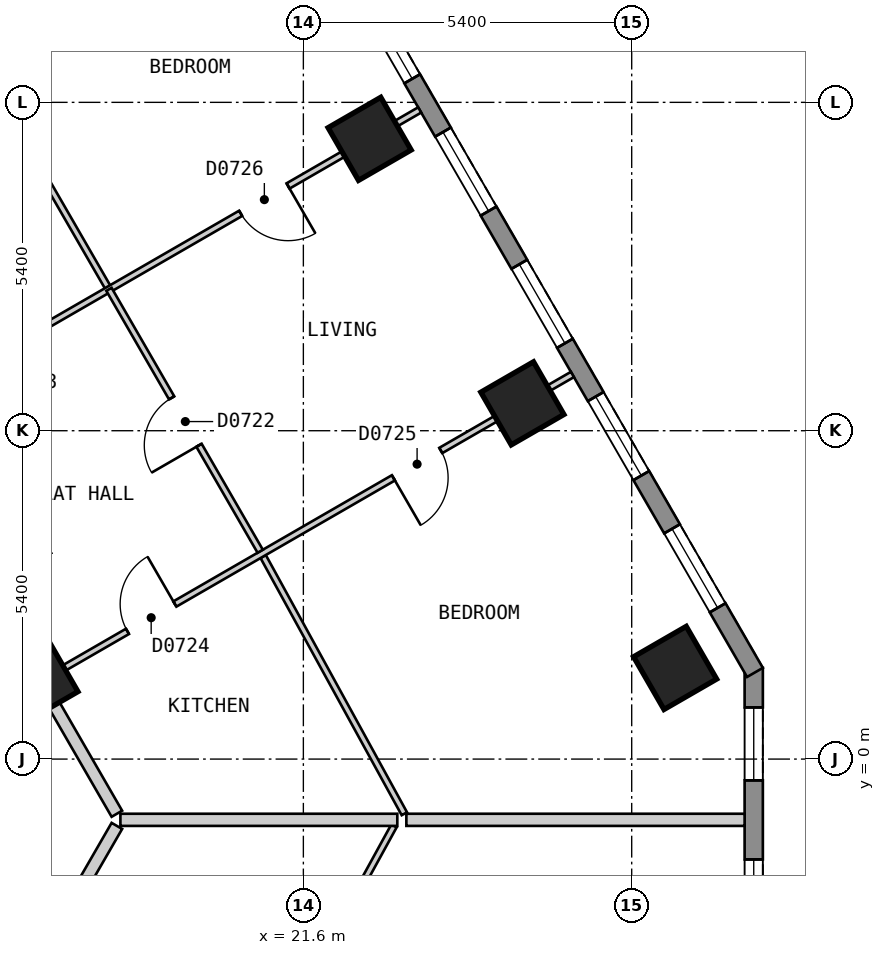
"""IFC4 building model, lengths in metres.
Left out: names, types, materials, properties, quantities, classifications, styles, units other than length and angle.
Written with IfcOpenShell. Run it as: python <this file> out.ifc"""

import sys

from ifc_helpers import new_model, si_unit, direction, frame, frame_2d, origin, origin_2d, place, context, subcontext, project, spatial, polyline, rectangle, outline, extrude, element, fill, save


model = new_model("IFC4")
c1 = context("Model", 3, precision=1e-05, world=origin(), true_north=direction((0.0, 1.0)))
c2 = subcontext(c1, "Body", "Model", "MODEL_VIEW")
j1 = project(units=[si_unit("LENGTHUNIT", "METRE"), si_unit("PLANEANGLEUNIT", "RADIAN")], contexts=[c1])
p1 = place(None, origin())
s1 = spatial("IfcSite", under=j1, at=p1, CompositionType="ELEMENT")
p2 = place(p1, origin())
s2 = spatial("IfcBuilding", under=s1, at=p2, CompositionType="ELEMENT")
p3 = place(p2, frame((0.0, 0.0, 105.0)))
s3 = spatial("IfcBuildingStorey", under=s2, at=p3, CompositionType="ELEMENT", Elevation=105.0)
for number, where, z_axis, x_axis in (
    (1, (27.714, 1.499, 0.0), (0.0, 0.0, 1.0), (-0.5, 0.866, 0.0)),
    (2, (25.202, 5.85, 0.0), (0.0, 0.0, 1.0), (-0.5, 0.866, 0.0)),
    (3, (22.69, 10.2, 0.0), (0.0, 0.0, 1.0), (-0.5, 0.866, 0.0)),
):
    element("IfcColumn", number, at=place(p3, frame(where, z_axis=z_axis, x_axis=x_axis)), inside=s3, PredefinedType="COLUMN", context=c2, shape_type="SweptSolid", body=[
        extrude(rectangle(XDim=1.0, YDim=1.0, at=origin_2d()), origin(), (0.0, 0.0, 1.0), 3.0),
    ])
p4 = place(p3, frame((17.278, 1.274, 0.0), z_axis=(0.0, 0.0, 1.0), x_axis=(-0.5, 0.866025403784, 0.0)))
e4 = element("IfcColumn", 4, at=p4, inside=s3, PredefinedType="COLUMN", context=c2, shape_type="SweptSolid", body=[
    extrude(rectangle(XDim=0.9, YDim=0.9, at=origin_2d()), origin(), (0.0, 0.0, 1.0), 3.0),
])
p5 = place(p3, frame((29.007, -3.5, 0.0), z_axis=(0.0, 0.0, 1.0), x_axis=(0.0, 1.0, 0.0)))
e5 = element("IfcWall", 5, at=p5, inside=s3, PredefinedType="SOLIDWALL", context=c2, shape_type="SweptSolid", body=[
    extrude(outline(polyline([(0.0, -0.15), (5.0, -0.15), (4.92, 0.15), (0.08, 0.15), (0.0, -0.15)])), origin(), (0.0, 0.0, 1.0), 2.6),
])
p6 = place(p5, frame((0.65, 0.0, 0.15)))
e6 = element("IfcOpeningElement", 6, at=p6, cuts=e5, PredefinedType="OPENING", context=c2, shape_type="SweptSolid", body=[
    extrude(rectangle(XDim=1.2, YDim=2.1, at=frame_2d((0.6, 1.05))), frame((0.0, 0.16, 0.0), z_axis=(0.0, -1.0, 0.0), x_axis=(1.0, 0.0, 0.0)), (0.0, 0.0, 1.0), 0.32),
])
p7 = place(p5, frame((3.15, 0.0, 0.15)))
e7 = element("IfcOpeningElement", 7, at=p7, cuts=e5, PredefinedType="OPENING", context=c2, shape_type="SweptSolid", body=[
    extrude(rectangle(XDim=1.2, YDim=2.1, at=frame_2d((0.6, 1.05))), frame((0.0, 0.16, 0.0), z_axis=(0.0, -1.0, 0.0), x_axis=(1.0, 0.0, 0.0)), (0.0, 0.0, 1.0), 0.32),
])
p8 = place(p3, frame((29.027, 1.425, 0.0), z_axis=(0.0, 0.0, 1.0), x_axis=(-0.500027479704, 0.866009537788, 0.0)))
e8 = element("IfcWall", 8, at=p8, inside=s3, PredefinedType="SOLIDWALL", context=c2, shape_type="SweptSolid", body=[
    extrude(outline(polyline([(0.0, -0.15), (26.559, -0.15), (26.478, 0.15), (0.08, 0.15), (0.0, -0.15)])), origin(), (0.0, 0.0, 1.0), 2.6),
])
p9 = place(p8, frame((1.227, 0.0, 0.15)))
e9 = element("IfcOpeningElement", 9, at=p9, cuts=e8, PredefinedType="OPENING", context=c2, shape_type="SweptSolid", body=[
    extrude(rectangle(XDim=1.5, YDim=2.1, at=frame_2d((0.75, 1.05))), frame((0.0, 0.16, 0.0), z_axis=(0.0, -1.0, 0.0), x_axis=(1.0, 0.0, 0.0)), (0.0, 0.0, 1.0), 0.32),
])
p10 = place(p8, frame((3.738, 0.0, 0.15)))
e10 = element("IfcOpeningElement", 10, at=p10, cuts=e8, PredefinedType="OPENING", context=c2, shape_type="SweptSolid", body=[
    extrude(rectangle(XDim=1.5, YDim=2.1, at=frame_2d((0.75, 1.05))), frame((0.0, 0.16, 0.0), z_axis=(0.0, -1.0, 0.0), x_axis=(1.0, 0.0, 0.0)), (0.0, 0.0, 1.0), 0.32),
])
p11 = place(p8, frame((6.25, 0.0, 0.15)))
e11 = element("IfcOpeningElement", 11, at=p11, cuts=e8, PredefinedType="OPENING", context=c2, shape_type="SweptSolid", body=[
    extrude(rectangle(XDim=1.5, YDim=2.1, at=frame_2d((0.75, 1.05))), frame((0.0, 0.16, 0.0), z_axis=(0.0, -1.0, 0.0), x_axis=(1.0, 0.0, 0.0)), (0.0, 0.0, 1.0), 0.32),
])
p12 = place(p8, frame((8.761, 0.0, 0.15)))
e12 = element("IfcOpeningElement", 12, at=p12, cuts=e8, PredefinedType="OPENING", context=c2, shape_type="SweptSolid", body=[
    extrude(rectangle(XDim=1.5, YDim=2.1, at=frame_2d((0.75, 1.05))), frame((0.0, 0.16, 0.0), z_axis=(0.0, -1.0, 0.0), x_axis=(1.0, 0.0, 0.0)), (0.0, 0.0, 1.0), 0.32),
])
p13 = place(p8, frame((11.273, 0.0, 0.15)))
e13 = element("IfcOpeningElement", 13, at=p13, cuts=e8, PredefinedType="OPENING", context=c2, shape_type="SweptSolid", body=[
    extrude(rectangle(XDim=1.5, YDim=2.1, at=frame_2d((0.75, 1.05))), frame((0.0, 0.16, 0.0), z_axis=(0.0, -1.0, 0.0), x_axis=(1.0, 0.0, 0.0)), (0.0, 0.0, 1.0), 0.32),
])
p14 = place(p8, frame((13.785, 0.0, 0.15)))
e14 = element("IfcOpeningElement", 14, at=p14, cuts=e8, PredefinedType="OPENING", context=c2, shape_type="SweptSolid", body=[
    extrude(rectangle(XDim=1.5, YDim=2.1, at=frame_2d((0.75, 1.05))), frame((0.0, 0.16, 0.0), z_axis=(0.0, -1.0, 0.0), x_axis=(1.0, 0.0, 0.0)), (0.0, 0.0, 1.0), 0.32),
])
p15 = place(p8, frame((16.296, 0.0, 0.15)))
e15 = element("IfcOpeningElement", 15, at=p15, cuts=e8, PredefinedType="OPENING", context=c2, shape_type="SweptSolid", body=[
    extrude(rectangle(XDim=1.5, YDim=2.1, at=frame_2d((0.75, 1.05))), frame((0.0, 0.16, 0.0), z_axis=(0.0, -1.0, 0.0), x_axis=(1.0, 0.0, 0.0)), (0.0, 0.0, 1.0), 0.32),
])
p16 = place(p8, frame((18.807, 0.0, 0.15)))
e16 = element("IfcOpeningElement", 16, at=p16, cuts=e8, PredefinedType="OPENING", context=c2, shape_type="SweptSolid", body=[
    extrude(rectangle(XDim=1.5, YDim=2.1, at=frame_2d((0.75, 1.05))), frame((0.0, 0.16, 0.0), z_axis=(0.0, -1.0, 0.0), x_axis=(1.0, 0.0, 0.0)), (0.0, 0.0, 1.0), 0.32),
])
p17 = place(p8, frame((21.319, 0.0, 0.15)))
e17 = element("IfcOpeningElement", 17, at=p17, cuts=e8, PredefinedType="OPENING", context=c2, shape_type="SweptSolid", body=[
    extrude(rectangle(XDim=1.5, YDim=2.1, at=frame_2d((0.75, 1.05))), frame((0.0, 0.16, 0.0), z_axis=(0.0, -1.0, 0.0), x_axis=(1.0, 0.0, 0.0)), (0.0, 0.0, 1.0), 0.32),
])
p18 = place(p8, frame((23.831, 0.0, 0.15)))
e18 = element("IfcOpeningElement", 18, at=p18, cuts=e8, PredefinedType="OPENING", context=c2, shape_type="SweptSolid", body=[
    extrude(rectangle(XDim=1.5, YDim=2.1, at=frame_2d((0.75, 1.05))), frame((0.0, 0.16, 0.0), z_axis=(0.0, -1.0, 0.0), x_axis=(1.0, 0.0, 0.0)), (0.0, 0.0, 1.0), 0.32),
])
p19 = place(p3, frame((8.488, 16.5, 0.0), z_axis=(0.0, 0.0, 1.0), x_axis=(0.499986836607, -0.86603300354, 0.0)))
e19 = element("IfcWall", 19, at=p19, inside=s3, PredefinedType="PARTITIONING", context=c2, shape_type="SweptSolid", body=[
    extrude(rectangle(XDim=20.09, YDim=0.2, at=frame_2d((10.045, 0.0))), origin(), (0.0, 0.0, 1.0), 2.6),
])
p20 = place(p19, frame((14.569, 0.0, 0.0)))
e20 = element("IfcOpeningElement", 20, at=p20, cuts=e19, PredefinedType="OPENING", context=c2, shape_type="SweptSolid", body=[
    extrude(rectangle(XDim=1.0, YDim=2.1, at=frame_2d((0.5, 1.05))), frame((0.0, 0.11, 0.0), z_axis=(0.0, -1.0, 0.0), x_axis=(1.0, 0.0, 0.0)), (0.0, 0.0, 1.0), 0.22),
])
p21 = place(p19, frame((4.547, 0.0, 0.0)))
e21 = element("IfcOpeningElement", 21, at=p21, cuts=e19, PredefinedType="OPENING", context=c2, shape_type="SweptSolid", body=[
    extrude(rectangle(XDim=1.0, YDim=2.1, at=frame_2d((0.5, 1.05))), frame((0.0, 0.11, 0.0), z_axis=(0.0, -1.0, 0.0), x_axis=(1.0, 0.0, 0.0)), (0.0, 0.0, 1.0), 0.22),
])
p22 = place(p3, frame((15.771, -5.884, 0.0), z_axis=(0.0, 0.0, 1.0), x_axis=(0.499917542299, 0.866073005526, 0.0)))
e22 = element("IfcWall", 22, at=p22, inside=s3, PredefinedType="PARTITIONING", context=c2, shape_type="SweptSolid", body=[
    extrude(rectangle(XDim=5.525, YDim=0.2, at=frame_2d((2.762, 0.0))), origin(), (0.0, 0.0, 1.0), 2.6),
])
p23 = place(p3, frame((15.942, 11.988, 0.0), z_axis=(0.0, 0.0, 1.0), x_axis=(0.499995794706, -0.866027831699, 0.0)))
e23 = element("IfcWall", 23, at=p23, inside=s3, PredefinedType="PARTITIONING", context=c2, shape_type="SweptSolid", body=[
    extrude(rectangle(XDim=4.922, YDim=0.1, at=frame_2d((2.461, 0.0))), origin(), (0.0, 0.0, 1.0), 2.6),
])
p24 = place(p3, frame((20.939, 3.331, 0.0), z_axis=(0.0, 0.0, 1.0), x_axis=(0.481207738216, -0.876606589458, 0.0)))
e24 = element("IfcWall", 24, at=p24, inside=s3, PredefinedType="PARTITIONING", context=c2, shape_type="SweptSolid", body=[
    extrude(rectangle(XDim=4.825, YDim=0.1, at=frame_2d((2.413, 0.0))), origin(), (0.0, 0.0, 1.0), 2.6),
])
p25 = place(p3, frame((20.812, -5.248, 0.0), z_axis=(0.0, 0.0, 1.0), x_axis=(0.481296891345, 0.876557643502, 0.0)))
e25 = element("IfcWall", 25, at=p25, inside=s3, PredefinedType="PARTITIONING", context=c2, shape_type="SweptSolid", body=[
    extrude(rectangle(XDim=4.733, YDim=0.1, at=frame_2d((2.367, 0.0))), origin(), (0.0, 0.0, 1.0), 2.6),
])
p26 = place(p3, frame((17.365, 1.325, 0.0), z_axis=(0.0, 0.0, 1.0), x_axis=(0.866016855193, 0.500014806302, 0.0)))
e26 = element("IfcWall", 26, at=p26, inside=s3, PredefinedType="PARTITIONING", context=c2, shape_type="SweptSolid", body=[
    extrude(rectangle(XDim=10.0, YDim=0.1, at=frame_2d((5.0, 0.0))), origin(), (0.0, 0.0, 1.0), 2.6),
])
p27 = place(p26, frame((1.55, 0.0, 0.0)))
e27 = element("IfcOpeningElement", 27, at=p27, cuts=e26, PredefinedType="OPENING", context=c2, shape_type="SweptSolid", body=[
    extrude(rectangle(XDim=0.9, YDim=2.1, at=frame_2d((0.45, 1.05))), frame((0.0, 0.06, 0.0), z_axis=(0.0, -1.0, 0.0), x_axis=(1.0, 0.0, 0.0)), (0.0, 0.0, 1.0), 0.12),
])
p28 = place(p26, frame((6.6, 0.0, 0.0)))
e28 = element("IfcOpeningElement", 28, at=p28, cuts=e26, PredefinedType="OPENING", context=c2, shape_type="SweptSolid", body=[
    extrude(rectangle(XDim=0.9, YDim=2.1, at=frame_2d((0.45, 1.05))), frame((0.0, 0.06, 0.0), z_axis=(0.0, -1.0, 0.0), x_axis=(1.0, 0.0, 0.0)), (0.0, 0.0, 1.0), 0.12),
])
p29 = place(p3, frame((14.853, 5.675, 0.0), z_axis=(0.0, 0.0, 1.0), x_axis=(0.866016855193, 0.500014806302, 0.0)))
e29 = element("IfcWall", 29, at=p29, inside=s3, PredefinedType="PARTITIONING", context=c2, shape_type="SweptSolid", body=[
    extrude(rectangle(XDim=10.0, YDim=0.1, at=frame_2d((5.0, 0.0))), origin(), (0.0, 0.0, 1.0), 2.6),
])
p30 = place(p29, frame((1.6, 0.0, 0.0)))
e30 = element("IfcOpeningElement", 30, at=p30, cuts=e29, PredefinedType="OPENING", context=c2, shape_type="SweptSolid", body=[
    extrude(rectangle(XDim=0.8, YDim=2.1, at=frame_2d((0.4, 1.05))), frame((0.0, 0.06, 0.0), z_axis=(0.0, -1.0, 0.0), x_axis=(1.0, 0.0, 0.0)), (0.0, 0.0, 1.0), 0.12),
])
p31 = place(p29, frame((6.6, 0.0, 0.0)))
e31 = element("IfcOpeningElement", 31, at=p31, cuts=e29, PredefinedType="OPENING", context=c2, shape_type="SweptSolid", body=[
    extrude(rectangle(XDim=0.9, YDim=2.1, at=frame_2d((0.45, 1.05))), frame((0.0, 0.06, 0.0), z_axis=(0.0, -1.0, 0.0), x_axis=(1.0, 0.0, 0.0)), (0.0, 0.0, 1.0), 0.12),
])
p32 = place(p3, frame((18.591, -0.999, 0.0), z_axis=(0.0, 0.0, 1.0), x_axis=(1.0, 0.0, 0.0)))
e32 = element("IfcWall", 32, at=p32, inside=s3, PredefinedType="PARTITIONING", context=c2, shape_type="SweptSolid", body=[
    extrude(rectangle(XDim=4.554, YDim=0.2, at=frame_2d((2.277, 0.0))), origin(), (0.0, 0.0, 1.0), 2.6),
])
p33 = place(p3, frame((23.294, -0.999, 0.0), z_axis=(0.0, 0.0, 1.0), x_axis=(1.0, 0.0, 0.0)))
e33 = element("IfcWall", 33, at=p33, inside=s3, PredefinedType="PARTITIONING", context=c2, shape_type="SweptSolid", body=[
    extrude(rectangle(XDim=5.563, YDim=0.2, at=frame_2d((2.781, 0.0))), origin(), (0.0, 0.0, 1.0), 2.6),
])
p34 = place(p3, frame((18.403, 7.725, 0.0), z_axis=(0.0, 0.0, 1.0), x_axis=(0.500014231302, -0.866017187182, 0.0)))
e34 = element("IfcWall", 34, at=p34, inside=s3, PredefinedType="PARTITIONING", context=c2, shape_type="SweptSolid", body=[
    extrude(rectangle(XDim=4.973, YDim=0.1, at=frame_2d((2.487, 0.0))), origin(), (0.0, 0.0, 1.0), 2.6),
])
p35 = place(p34, frame((2.061, 0.0, 0.0)))
e35 = element("IfcOpeningElement", 35, at=p35, cuts=e34, PredefinedType="OPENING", context=c2, shape_type="SweptSolid", body=[
    extrude(rectangle(XDim=0.9, YDim=2.1, at=frame_2d((0.45, 1.05))), frame((0.0, 0.06, 0.0), z_axis=(0.0, -1.0, 0.0), x_axis=(1.0, 0.0, 0.0)), (0.0, 0.0, 1.0), 0.12),
])
p36 = place(p6, origin())
e36 = element("IfcWindow", 36, at=p36, inside=s3, PartitioningType="SINGLE_PANEL", PredefinedType="WINDOW", context=c2, shape_type="SweptSolid", body=[
    extrude(rectangle(XDim=1.2, YDim=2.1, at=frame_2d((0.6, 1.05))), frame((0.0, 0.03, 0.0), z_axis=(0.0, -1.0, 0.0), x_axis=(1.0, 0.0, 0.0)), (0.0, 0.0, 1.0), 0.06),
])
fill(e6, e36)
p37 = place(p7, origin())
e37 = element("IfcWindow", 37, at=p37, inside=s3, PartitioningType="SINGLE_PANEL", PredefinedType="WINDOW", context=c2, shape_type="SweptSolid", body=[
    extrude(rectangle(XDim=1.2, YDim=2.1, at=frame_2d((0.6, 1.05))), frame((0.0, 0.03, 0.0), z_axis=(0.0, -1.0, 0.0), x_axis=(1.0, 0.0, 0.0)), (0.0, 0.0, 1.0), 0.06),
])
fill(e7, e37)
p38 = place(p9, origin())
e38 = element("IfcWindow", 38, at=p38, inside=s3, PartitioningType="SINGLE_PANEL", PredefinedType="WINDOW", context=c2, shape_type="SweptSolid", body=[
    extrude(rectangle(XDim=1.5, YDim=2.1, at=frame_2d((0.75, 1.05))), frame((0.0, 0.03, 0.0), z_axis=(0.0, -1.0, 0.0), x_axis=(1.0, 0.0, 0.0)), (0.0, 0.0, 1.0), 0.06),
])
fill(e9, e38)
p39 = place(p10, origin())
e39 = element("IfcWindow", 39, at=p39, inside=s3, PartitioningType="SINGLE_PANEL", PredefinedType="WINDOW", context=c2, shape_type="SweptSolid", body=[
    extrude(rectangle(XDim=1.5, YDim=2.1, at=frame_2d((0.75, 1.05))), frame((0.0, 0.03, 0.0), z_axis=(0.0, -1.0, 0.0), x_axis=(1.0, 0.0, 0.0)), (0.0, 0.0, 1.0), 0.06),
])
fill(e10, e39)
p40 = place(p11, origin())
e40 = element("IfcWindow", 40, at=p40, inside=s3, PartitioningType="SINGLE_PANEL", PredefinedType="WINDOW", context=c2, shape_type="SweptSolid", body=[
    extrude(rectangle(XDim=1.5, YDim=2.1, at=frame_2d((0.75, 1.05))), frame((0.0, 0.03, 0.0), z_axis=(0.0, -1.0, 0.0), x_axis=(1.0, 0.0, 0.0)), (0.0, 0.0, 1.0), 0.06),
])
fill(e11, e40)
p41 = place(p12, origin())
e41 = element("IfcWindow", 41, at=p41, inside=s3, PartitioningType="SINGLE_PANEL", PredefinedType="WINDOW", context=c2, shape_type="SweptSolid", body=[
    extrude(rectangle(XDim=1.5, YDim=2.1, at=frame_2d((0.75, 1.05))), frame((0.0, 0.03, 0.0), z_axis=(0.0, -1.0, 0.0), x_axis=(1.0, 0.0, 0.0)), (0.0, 0.0, 1.0), 0.06),
])
fill(e12, e41)
p42 = place(p13, origin())
e42 = element("IfcWindow", 42, at=p42, inside=s3, PartitioningType="SINGLE_PANEL", PredefinedType="WINDOW", context=c2, shape_type="SweptSolid", body=[
    extrude(rectangle(XDim=1.5, YDim=2.1, at=frame_2d((0.75, 1.05))), frame((0.0, 0.03, 0.0), z_axis=(0.0, -1.0, 0.0), x_axis=(1.0, 0.0, 0.0)), (0.0, 0.0, 1.0), 0.06),
])
fill(e13, e42)
p43 = place(p35, origin())
e43 = element("IfcDoor", 43, at=p43, inside=s3, OperationType="SINGLE_SWING_RIGHT", PredefinedType="DOOR", context=c2, shape_type="SweptSolid", body=[
    extrude(rectangle(XDim=0.9, YDim=2.1, at=frame_2d((0.45, 1.05))), frame((0.0, 0.025, 0.0), z_axis=(0.0, -1.0, 0.0), x_axis=(1.0, 0.0, 0.0)), (0.0, 0.0, 1.0), 0.05),
])
fill(e35, e43)
p44 = place(p27, origin())
e44 = element("IfcDoor", 44, at=p44, inside=s3, OperationType="SINGLE_SWING_RIGHT", PredefinedType="DOOR", context=c2, shape_type="SweptSolid", body=[
    extrude(rectangle(XDim=0.9, YDim=2.1, at=frame_2d((0.45, 1.05))), frame((0.0, 0.025, 0.0), z_axis=(0.0, -1.0, 0.0), x_axis=(1.0, 0.0, 0.0)), (0.0, 0.0, 1.0), 0.05),
])
fill(e27, e44)
p45 = place(p28, origin())
e45 = element("IfcDoor", 45, at=p45, inside=s3, OperationType="SINGLE_SWING_LEFT", PredefinedType="DOOR", context=c2, shape_type="SweptSolid", body=[
    extrude(rectangle(XDim=0.9, YDim=2.1, at=frame_2d((0.45, 1.05))), frame((0.0, 0.025, 0.0), z_axis=(0.0, -1.0, 0.0), x_axis=(1.0, 0.0, 0.0)), (0.0, 0.0, 1.0), 0.05),
])
fill(e28, e45)
p46 = place(p31, origin())
e46 = element("IfcDoor", 46, at=p46, inside=s3, OperationType="SINGLE_SWING_RIGHT", PredefinedType="DOOR", context=c2, shape_type="SweptSolid", body=[
    extrude(rectangle(XDim=0.9, YDim=2.1, at=frame_2d((0.45, 1.05))), frame((0.0, 0.025, 0.0), z_axis=(0.0, -1.0, 0.0), x_axis=(1.0, 0.0, 0.0)), (0.0, 0.0, 1.0), 0.05),
])
fill(e31, e46)
save(model, sys.argv[1])
